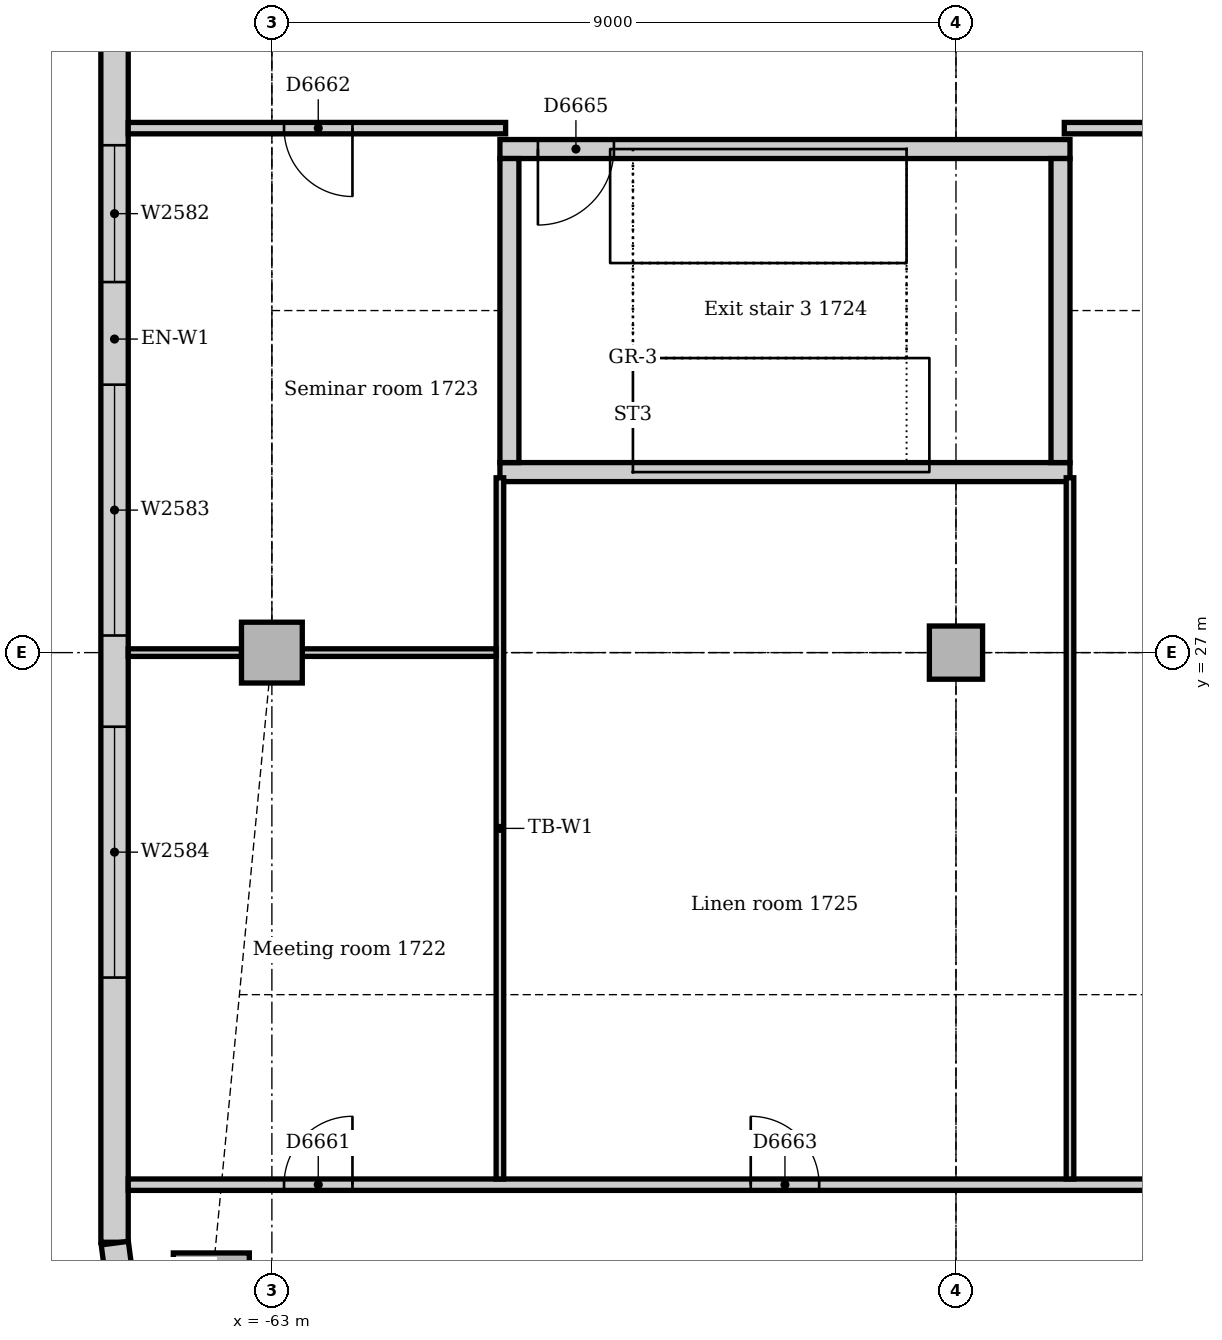
"""IFC4 building model, lengths in metres.
Left out: names, types, materials, properties, quantities, classifications, styles, units other than length and angle.
Written with IfcOpenShell. Run it as: python <this file> out.ifc"""

import sys

from ifc_helpers import new_model, si_unit, direction, frame, frame_2d, origin, origin_2d, place, context, subcontext, project, spatial, rectangle, extrude, element, fill, save


model = new_model("IFC4")
c1 = context("Model", 3, precision=1e-05, world=origin(), true_north=direction((0.0, 1.0)))
c2 = subcontext(c1, "Body", "Model", "MODEL_VIEW")
j1 = project(units=[si_unit("LENGTHUNIT", "METRE"), si_unit("PLANEANGLEUNIT", "RADIAN")], contexts=[c1])
p1 = place(None, origin())
s1 = spatial("IfcSite", under=j1, at=p1, CompositionType="ELEMENT")
p2 = place(p1, origin())
s2 = spatial("IfcBuilding", under=s1, at=p2, CompositionType="ELEMENT")
p3 = place(p2, frame((0.0, 0.0, 75.0)))
s3 = spatial("IfcBuildingStorey", under=s2, at=p3, CompositionType="ELEMENT", Elevation=75.0)
p4 = place(p3, frame((-60.0, 29.375, 0.0), z_axis=(0.0, 0.0, 1.0), x_axis=(1.0, 0.0, 0.0)))
e1 = element("IfcWall", 1, at=p4, inside=s3, PredefinedType="SOLIDWALL", context=c2, shape_type="SweptSolid", body=[
    extrude(rectangle(XDim=7.5, YDim=0.25, at=frame_2d((3.75, 0.0))), origin(), (0.0, 0.0, 1.0), 4.0),
])
p5 = place(p3, frame((-52.5, 33.625, 0.0), z_axis=(0.0, 0.0, 1.0), x_axis=(-1.0, 0.0, 0.0)))
e2 = element("IfcWall", 2, at=p5, inside=s3, PredefinedType="SOLIDWALL", context=c2, shape_type="SweptSolid", body=[
    extrude(rectangle(XDim=7.5, YDim=0.25, at=frame_2d((3.75, 0.0))), origin(), (0.0, 0.0, 1.0), 4.0),
])
p6 = place(p5, frame((6.0, 0.0, 0.0)))
e3 = element("IfcOpeningElement", 3, at=p6, cuts=e2, PredefinedType="OPENING", context=c2, shape_type="SweptSolid", body=[
    extrude(rectangle(XDim=1.0, YDim=2.1, at=frame_2d((0.5, 1.05))), frame((0.0, 0.135, 0.0), z_axis=(0.0, -1.0, 0.0), x_axis=(1.0, 0.0, 0.0)), (0.0, 0.0, 1.0), 0.27),
])
for number, where, z_axis, x_axis in (
    (4, (-52.625, 29.5, 0.0), (0.0, 0.0, 1.0), (0.0, 1.0, 0.0)),
    (5, (-59.875, 33.5, 0.0), (0.0, 0.0, 1.0), (0.0, -1.0, 0.0)),
):
    element("IfcWall", number, at=place(p3, frame(where, z_axis=z_axis, x_axis=x_axis)), inside=s3, PredefinedType="SOLIDWALL", context=c2, shape_type="SweptSolid", body=[
        extrude(rectangle(XDim=4.0, YDim=0.25, at=frame_2d((2.0, 0.0))), origin(), (0.0, 0.0, 1.0), 4.0),
    ])
p7 = place(p3, frame((-63.797, 18.602, 0.0), z_axis=(0.0, 0.0, 1.0), x_axis=(1.0, 0.0, 0.0)))
e6 = element("IfcColumn", 6, at=p7, inside=s3, PredefinedType="COLUMN", context=c2, shape_type="SweptSolid", body=[
    extrude(rectangle(XDim=1.0, YDim=1.0, at=origin_2d()), origin(), (0.0, 0.0, 1.0), 3.85),
])
p8 = place(p3, frame((-63.0, 27.0, 0.0), z_axis=(0.0, 0.0, 1.0), x_axis=(1.0, 0.0, 0.0)))
e7 = element("IfcColumn", 7, at=p8, inside=s3, PredefinedType="COLUMN", context=c2, shape_type="SweptSolid", body=[
    extrude(rectangle(XDim=0.8, YDim=0.8, at=origin_2d()), origin(), (0.0, 0.0, 1.0), 3.85),
])
p9 = place(p3, frame((-54.0, 27.0, 0.0), z_axis=(0.0, 0.0, 1.0), x_axis=(1.0, 0.0, 0.0)))
e8 = element("IfcColumn", 8, at=p9, inside=s3, PredefinedType="COLUMN", context=c2, shape_type="SweptSolid", body=[
    extrude(rectangle(XDim=0.7, YDim=0.7, at=origin_2d()), origin(), (0.0, 0.0, 1.0), 3.85),
])
p10 = place(p3, frame((-65.07, 43.007, 0.0), z_axis=(0.0, 0.0, 1.0), x_axis=(0.0, -1.0, 0.0)))
e9 = element("IfcWall", 9, at=p10, inside=s3, PredefinedType="STANDARD", context=c2, shape_type="SweptSolid", body=[
    extrude(rectangle(XDim=23.765, YDim=0.36, at=frame_2d((11.882, 0.0))), origin(), (0.0, 0.0, 1.0), 3.85),
])
p11 = place(p10, frame((4.232, 0.0, 0.9)))
e10 = element("IfcOpeningElement", 10, at=p11, cuts=e9, PredefinedType="OPENING", context=c2, shape_type="SweptSolid", body=[
    extrude(rectangle(XDim=1.8, YDim=1.6, at=frame_2d((0.9, 0.8))), frame((0.0, 0.19, 0.0), z_axis=(0.0, -1.0, 0.0), x_axis=(1.0, 0.0, 0.0)), (0.0, 0.0, 1.0), 0.38),
])
p12 = place(p10, frame((9.332, 0.0, 0.9)))
e11 = element("IfcOpeningElement", 11, at=p12, cuts=e9, PredefinedType="OPENING", context=c2, shape_type="SweptSolid", body=[
    extrude(rectangle(XDim=1.8, YDim=1.6, at=frame_2d((0.9, 0.8))), frame((0.0, 0.19, 0.0), z_axis=(0.0, -1.0, 0.0), x_axis=(1.0, 0.0, 0.0)), (0.0, 0.0, 1.0), 0.38),
])
p13 = place(p10, frame((12.482, 0.0, 0.9)))
e12 = element("IfcOpeningElement", 12, at=p13, cuts=e9, PredefinedType="OPENING", context=c2, shape_type="SweptSolid", body=[
    extrude(rectangle(XDim=3.3, YDim=1.6, at=frame_2d((1.65, 0.8))), frame((0.0, 0.19, 0.0), z_axis=(0.0, -1.0, 0.0), x_axis=(1.0, 0.0, 0.0)), (0.0, 0.0, 1.0), 0.38),
])
p14 = place(p10, frame((16.982, 0.0, 0.9)))
e13 = element("IfcOpeningElement", 13, at=p14, cuts=e9, PredefinedType="OPENING", context=c2, shape_type="SweptSolid", body=[
    extrude(rectangle(XDim=3.3, YDim=1.6, at=frame_2d((1.65, 0.8))), frame((0.0, 0.19, 0.0), z_axis=(0.0, -1.0, 0.0), x_axis=(1.0, 0.0, 0.0)), (0.0, 0.0, 1.0), 0.38),
])
p15 = place(p3, frame((-65.067, 19.231, 0.0), z_axis=(0.0, 0.0, 1.0), x_axis=(0.13055608231, -0.99144092581, 0.0)))
e14 = element("IfcWall", 14, at=p15, inside=s3, PredefinedType="STANDARD", context=c2, shape_type="SweptSolid", body=[
    extrude(rectangle(XDim=0.713, YDim=0.36, at=frame_2d((0.356, 0.0))), origin(), (0.0, 0.0, 1.0), 3.85),
])
p16 = place(p3, frame((-64.89, 20.0, 0.0), z_axis=(0.0, 0.0, 1.0), x_axis=(1.0, 0.0, 0.0)))
e15 = element("IfcWall", 15, at=p16, inside=s3, PredefinedType="PARTITIONING", context=c2, shape_type="SweptSolid", body=[
    extrude(rectangle(XDim=19.965, YDim=0.15, at=frame_2d((9.982, 0.0))), origin(), (0.0, 0.0, 1.0), 3.85),
])
p17 = place(p16, frame((2.05, 0.0, 0.0)))
e16 = element("IfcOpeningElement", 16, at=p17, cuts=e15, PredefinedType="OPENING", context=c2, shape_type="SweptSolid", body=[
    extrude(rectangle(XDim=0.9, YDim=2.1, at=frame_2d((0.45, 1.05))), frame((0.0, 0.085, 0.0), z_axis=(0.0, -1.0, 0.0), x_axis=(1.0, 0.0, 0.0)), (0.0, 0.0, 1.0), 0.17),
])
p18 = place(p16, frame((8.19, 0.0, 0.0)))
e17 = element("IfcOpeningElement", 17, at=p18, cuts=e15, PredefinedType="OPENING", context=c2, shape_type="SweptSolid", body=[
    extrude(rectangle(XDim=0.9, YDim=2.1, at=frame_2d((0.45, 1.05))), frame((0.0, 0.085, 0.0), z_axis=(0.0, -1.0, 0.0), x_axis=(1.0, 0.0, 0.0)), (0.0, 0.0, 1.0), 0.17),
])
p19 = place(p3, frame((-52.575, 33.9, 0.0), z_axis=(0.0, 0.0, 1.0), x_axis=(1.0, 0.0, 0.0)))
e18 = element("IfcWall", 18, at=p19, inside=s3, PredefinedType="PARTITIONING", context=c2, shape_type="SweptSolid", body=[
    extrude(rectangle(XDim=7.5, YDim=0.15, at=frame_2d((3.75, 0.0))), origin(), (0.0, 0.0, 1.0), 3.85),
])
p20 = place(p3, frame((-64.89, 33.9, 0.0), z_axis=(0.0, 0.0, 1.0), x_axis=(1.0, 0.0, 0.0)))
e19 = element("IfcWall", 19, at=p20, inside=s3, PredefinedType="PARTITIONING", context=c2, shape_type="SweptSolid", body=[
    extrude(rectangle(XDim=4.965, YDim=0.15, at=frame_2d((2.482, 0.0))), origin(), (0.0, 0.0, 1.0), 3.85),
])
p21 = place(p20, frame((2.05, 0.0, 0.0)))
e20 = element("IfcOpeningElement", 20, at=p21, cuts=e19, PredefinedType="OPENING", context=c2, shape_type="SweptSolid", body=[
    extrude(rectangle(XDim=0.9, YDim=2.1, at=frame_2d((0.45, 1.05))), frame((0.0, 0.085, 0.0), z_axis=(0.0, -1.0, 0.0), x_axis=(1.0, 0.0, 0.0)), (0.0, 0.0, 1.0), 0.17),
])
for number, where, z_axis, x_axis in (
    (21, (-60.0, 20.075, 0.0), (0.0, 0.0, 1.0), (0.0, 1.0, 0.0)),
    (22, (-52.5, 20.075, 0.0), (0.0, 0.0, 1.0), (0.0, 1.0, 0.0)),
):
    element("IfcWall", number, at=place(p3, frame(where, z_axis=z_axis, x_axis=x_axis)), inside=s3, PredefinedType="PARTITIONING", context=c2, shape_type="SweptSolid", body=[
        extrude(rectangle(XDim=9.225, YDim=0.1, at=frame_2d((4.612, 0.0))), origin(), (0.0, 0.0, 1.0), 3.85),
    ])
p22 = place(p3, frame((-62.6, 27.0, 0.0), z_axis=(0.0, 0.0, 1.0), x_axis=(1.0, 0.0, 0.0)))
e23 = element("IfcWall", 23, at=p22, inside=s3, PredefinedType="PARTITIONING", context=c2, shape_type="SweptSolid", body=[
    extrude(rectangle(XDim=2.55, YDim=0.1, at=frame_2d((1.275, 0.0))), origin(), (0.0, 0.0, 1.0), 3.158),
])
p23 = place(p3, frame((-64.89, 27.0, 0.0), z_axis=(0.0, 0.0, 1.0), x_axis=(1.0, 0.0, 0.0)))
e24 = element("IfcWall", 24, at=p23, inside=s3, PredefinedType="PARTITIONING", context=c2, shape_type="SweptSolid", body=[
    extrude(rectangle(XDim=1.49, YDim=0.1, at=frame_2d((0.745, 0.0))), origin(), (0.0, 0.0, 1.0), 3.85),
])
p24 = place(p12, origin())
e25 = element("IfcWindow", 25, at=p24, inside=s3, PartitioningType="SINGLE_PANEL", PredefinedType="WINDOW", context=c2, shape_type="SweptSolid", body=[
    extrude(rectangle(XDim=1.8, YDim=1.6, at=frame_2d((0.9, 0.8))), frame((0.0, 0.13, 0.0), z_axis=(0.0, -1.0, 0.0), x_axis=(1.0, 0.0, 0.0)), (0.0, 0.0, 1.0), 0.06),
])
fill(e11, e25)
p25 = place(p13, origin())
e26 = element("IfcWindow", 26, at=p25, inside=s3, PartitioningType="SINGLE_PANEL", PredefinedType="WINDOW", context=c2, shape_type="SweptSolid", body=[
    extrude(rectangle(XDim=3.3, YDim=1.6, at=frame_2d((1.65, 0.8))), frame((0.0, 0.13, 0.0), z_axis=(0.0, -1.0, 0.0), x_axis=(1.0, 0.0, 0.0)), (0.0, 0.0, 1.0), 0.06),
])
fill(e12, e26)
p26 = place(p14, origin())
e27 = element("IfcWindow", 27, at=p26, inside=s3, PartitioningType="SINGLE_PANEL", PredefinedType="WINDOW", context=c2, shape_type="SweptSolid", body=[
    extrude(rectangle(XDim=3.3, YDim=1.6, at=frame_2d((1.65, 0.8))), frame((0.0, 0.13, 0.0), z_axis=(0.0, -1.0, 0.0), x_axis=(1.0, 0.0, 0.0)), (0.0, 0.0, 1.0), 0.06),
])
fill(e13, e27)
p27 = place(p17, origin())
e28 = element("IfcDoor", 28, at=p27, inside=s3, OperationType="SINGLE_SWING_RIGHT", PredefinedType="DOOR", context=c2, shape_type="SweptSolid", body=[
    extrude(rectangle(XDim=0.9, YDim=2.1, at=frame_2d((0.45, 1.05))), frame((0.0, 0.025, 0.0), z_axis=(0.0, -1.0, 0.0), x_axis=(1.0, 0.0, 0.0)), (0.0, 0.0, 1.0), 0.05),
])
fill(e16, e28)
p28 = place(p21, frame((0.9, 0.0, 0.0), z_axis=(0.0, 0.0, 1.0), x_axis=(-1.0, 0.0, 0.0)))
e29 = element("IfcDoor", 29, at=p28, inside=s3, OperationType="SINGLE_SWING_LEFT", PredefinedType="DOOR", context=c2, shape_type="SweptSolid", body=[
    extrude(rectangle(XDim=0.9, YDim=2.1, at=frame_2d((0.45, 1.05))), frame((0.0, 0.025, 0.0), z_axis=(0.0, -1.0, 0.0), x_axis=(1.0, 0.0, 0.0)), (0.0, 0.0, 1.0), 0.05),
])
fill(e20, e29)
p29 = place(p18, origin())
e30 = element("IfcDoor", 30, at=p29, inside=s3, OperationType="SINGLE_SWING_LEFT", PredefinedType="DOOR", context=c2, shape_type="SweptSolid", body=[
    extrude(rectangle(XDim=0.9, YDim=2.1, at=frame_2d((0.45, 1.05))), frame((0.0, 0.025, 0.0), z_axis=(0.0, -1.0, 0.0), x_axis=(1.0, 0.0, 0.0)), (0.0, 0.0, 1.0), 0.05),
])
fill(e17, e30)
p30 = place(p6, origin())
e31 = element("IfcDoor", 31, at=p30, inside=s3, OperationType="SINGLE_SWING_RIGHT", PredefinedType="DOOR", context=c2, shape_type="SweptSolid", body=[
    extrude(rectangle(XDim=1.0, YDim=2.1, at=frame_2d((0.5, 1.05))), frame((0.0, 0.025, 0.0), z_axis=(0.0, -1.0, 0.0), x_axis=(1.0, 0.0, 0.0)), (0.0, 0.0, 1.0), 0.05),
])
fill(e3, e31)
save(model, sys.argv[1])
